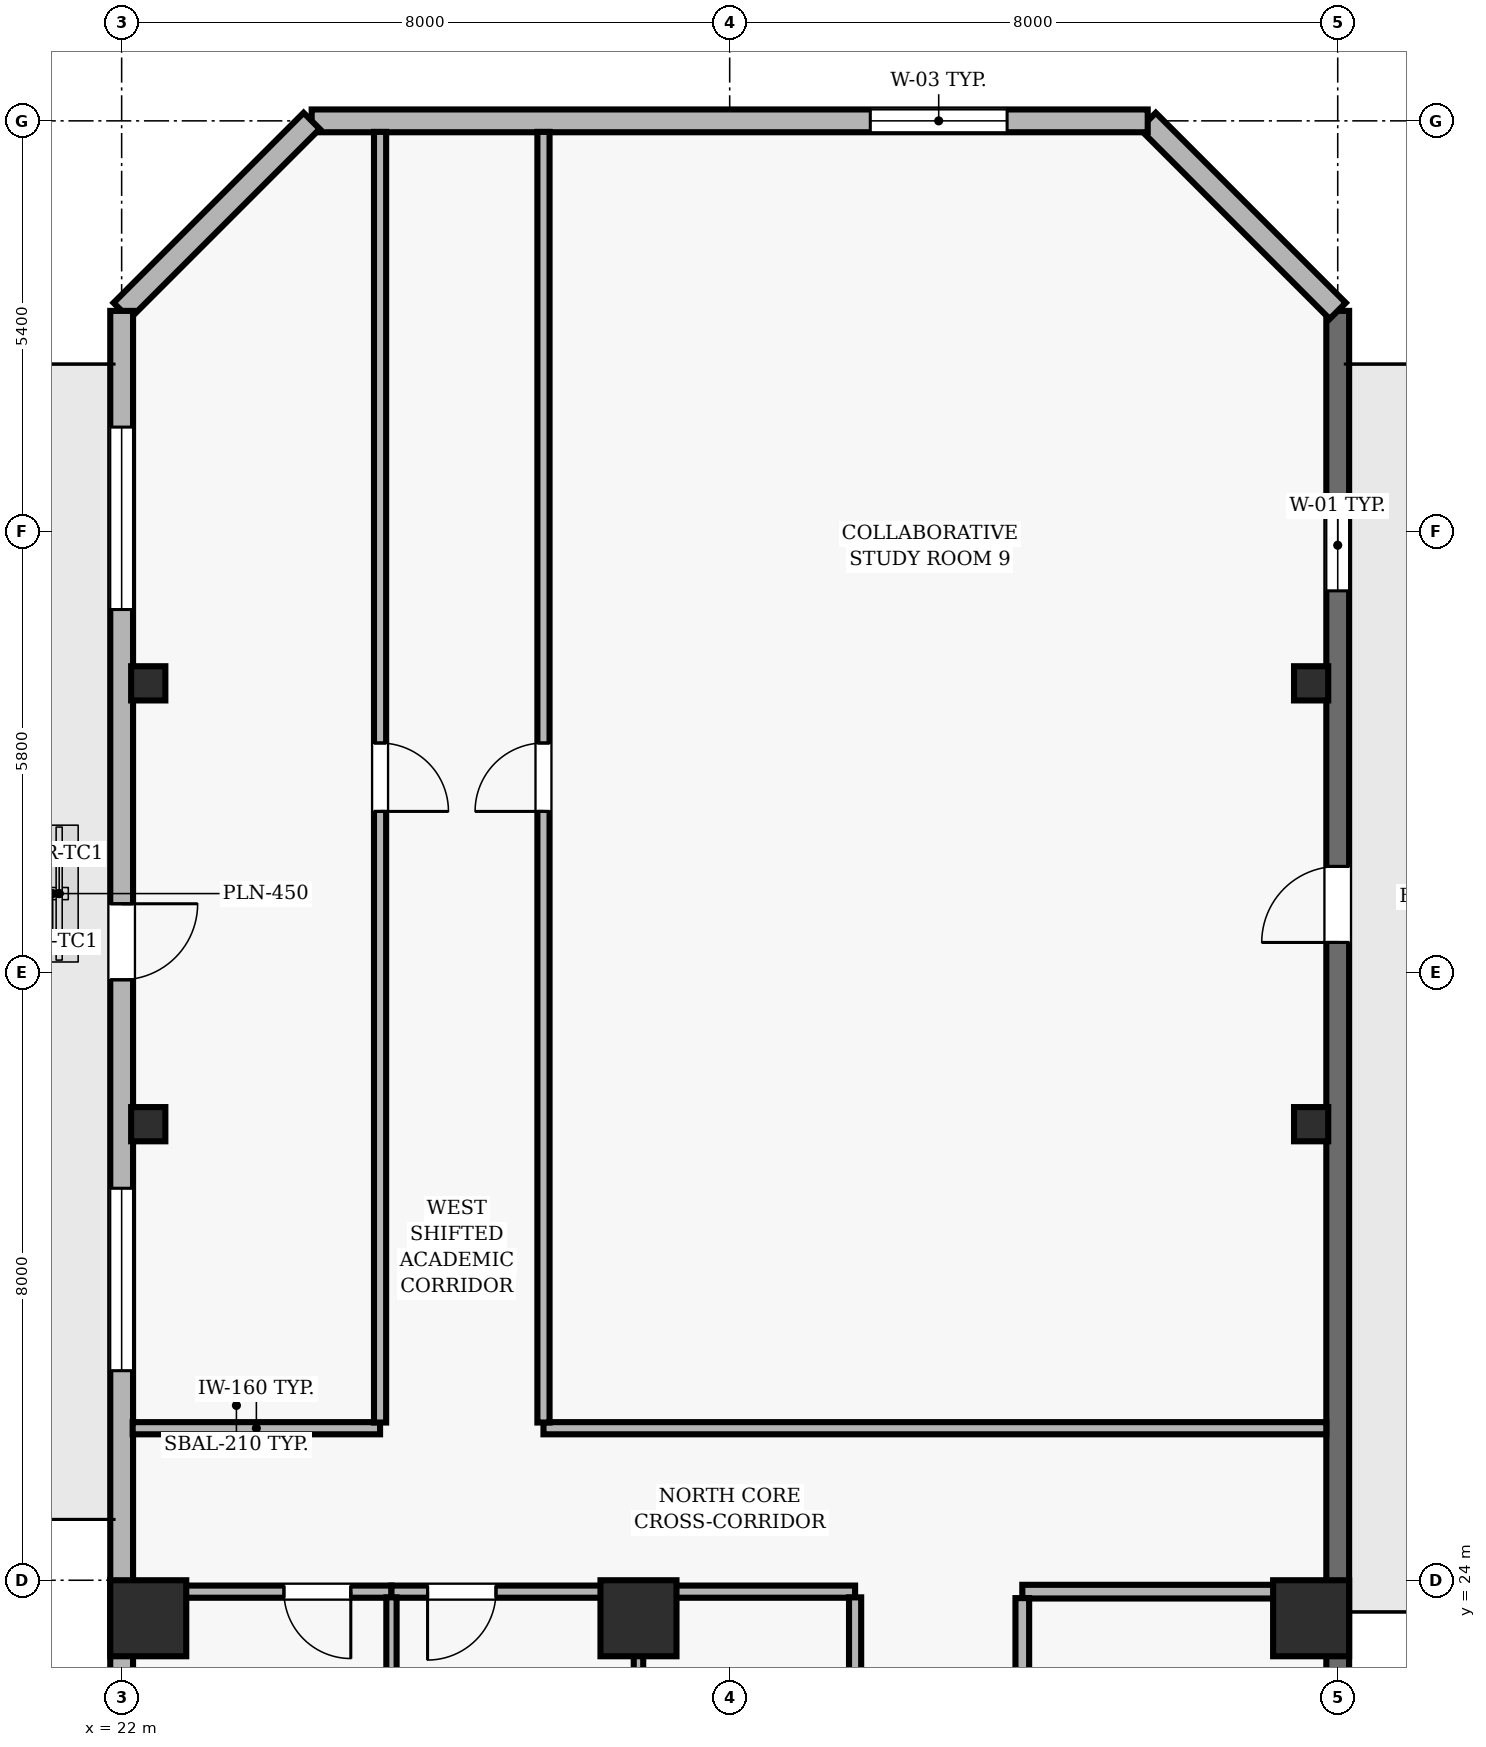
"""IFC4 building model, lengths in metres.
Left out: names, types, materials, properties, quantities, classifications, styles, units other than length and angle.
Written with IfcOpenShell. Run it as: python <this file> out.ifc"""

import sys

from ifc_helpers import new_model, si_unit, direction, frame, frame_2d, origin, origin_2d, place, context, subcontext, project, spatial, rectangle, hollow_rectangle, extrude, element, fill, save


model = new_model("IFC4")
c1 = context("Model", 3, precision=1e-05, world=origin(), true_north=direction((0.0, 1.0)))
c2 = subcontext(c1, "Body", "Model", "MODEL_VIEW")
j1 = project(units=[si_unit("LENGTHUNIT", "METRE"), si_unit("PLANEANGLEUNIT", "RADIAN")], contexts=[c1])
p1 = place(None, origin())
s1 = spatial("IfcSite", under=j1, at=p1, CompositionType="ELEMENT")
p2 = place(p1, origin())
s2 = spatial("IfcBuilding", under=s1, at=p2, CompositionType="ELEMENT")
p3 = place(p2, frame((0.0, 0.0, 214.8)))
s3 = spatial("IfcBuildingStorey", under=s2, at=p3, CompositionType="ELEMENT", Elevation=214.8)
for number, where, z_axis, x_axis in (
    (1, (22.35, 23.5, 0.0), (0.0, 0.0, 1.0), (1.0, 0.0, 0.0)),
    (2, (28.8, 23.5, 0.0), (0.0, 0.0, 1.0), (1.0, 0.0, 0.0)),
    (3, (37.65, 23.5, 0.0), (0.0, 0.0, 1.0), (1.0, 0.0, 0.0)),
):
    element("IfcColumn", number, at=place(p3, frame(where, z_axis=z_axis, x_axis=x_axis)), inside=s3, PredefinedType="COLUMN", context=c2, shape_type="SweptSolid", body=[
        extrude(rectangle(XDim=1.0, YDim=1.0, at=origin_2d()), origin(), (0.0, 0.0, 1.0), 3.9),
    ])
for number, where, z_axis, x_axis in (
    (4, (22.35, 30.0, 0.0), (0.0, 0.0, 1.0), (1.0, 0.0, 0.0)),
    (5, (37.65, 30.0, 0.0), (0.0, 0.0, 1.0), (1.0, 0.0, 0.0)),
    (6, (22.35, 35.8, 0.0), (0.0, 0.0, 1.0), (1.0, 0.0, 0.0)),
    (7, (37.65, 35.8, 0.0), (0.0, 0.0, 1.0), (1.0, 0.0, 0.0)),
):
    element("IfcColumn", number, at=place(p3, frame(where, z_axis=z_axis, x_axis=x_axis)), inside=s3, PredefinedType="COLUMN", context=c2, shape_type="SweptSolid", body=[
        extrude(hollow_rectangle(XDim=0.45, YDim=0.45, WallThickness=0.02, at=origin_2d()), origin(), (0.0, 0.0, 1.0), 3.9),
    ])
p4 = place(p3, frame((38.0, 22.2, 0.0), z_axis=(0.0, 0.0, 1.0), x_axis=(0.0, 1.0, 0.0)))
e8 = element("IfcWall", 8, at=p4, inside=s3, PredefinedType="SOLIDWALL", context=c2, shape_type="SweptSolid", body=[
    extrude(rectangle(XDim=18.5, YDim=0.3, at=frame_2d((9.25, 0.0))), origin(), (0.0, 0.0, 1.0), 3.69),
])
p5 = place(p4, frame((10.191, 0.0, 0.0)))
e9 = element("IfcOpeningElement", 9, at=p5, cuts=e8, PredefinedType="OPENING", context=c2, shape_type="SweptSolid", body=[
    extrude(rectangle(XDim=1.0, YDim=2.2, at=frame_2d((0.5, 1.1))), frame((0.0, 0.16, 0.0), z_axis=(0.0, -1.0, 0.0), x_axis=(1.0, 0.0, 0.0)), (0.0, 0.0, 1.0), 0.32),
])
p6 = place(p4, frame((14.817, 0.0, 0.9)))
e10 = element("IfcOpeningElement", 10, at=p6, cuts=e8, PredefinedType="OPENING", context=c2, shape_type="SweptSolid", body=[
    extrude(rectangle(XDim=1.2, YDim=1.6, at=frame_2d((0.6, 0.8))), frame((0.0, 0.16, 0.0), z_axis=(0.0, -1.0, 0.0), x_axis=(1.0, 0.0, 0.0)), (0.0, 0.0, 1.0), 0.32),
])
p7 = place(p3, frame((38.0, 40.7, 0.0), z_axis=(0.0, 0.0, 1.0), x_axis=(-0.707106781187, 0.707106781187, 0.0)))
e11 = element("IfcWall", 11, at=p7, inside=s3, PredefinedType="SOLIDWALL", context=c2, shape_type="SweptSolid", body=[
    extrude(rectangle(XDim=3.536, YDim=0.3, at=frame_2d((1.768, 0.0))), origin(), (0.0, 0.0, 1.0), 3.69),
])
p8 = place(p3, frame((35.5, 43.2, 0.0), z_axis=(0.0, 0.0, 1.0), x_axis=(-1.0, 0.0, 0.0)))
e12 = element("IfcWall", 12, at=p8, inside=s3, PredefinedType="SOLIDWALL", context=c2, shape_type="SweptSolid", body=[
    extrude(rectangle(XDim=11.0, YDim=0.3, at=frame_2d((5.5, 0.0))), origin(), (0.0, 0.0, 1.0), 3.69),
])
p9 = place(p8, frame((1.85, 0.0, 0.9)))
e13 = element("IfcOpeningElement", 13, at=p9, cuts=e12, PredefinedType="OPENING", context=c2, shape_type="SweptSolid", body=[
    extrude(rectangle(XDim=1.8, YDim=1.6, at=frame_2d((0.9, 0.8))), frame((0.0, 0.16, 0.0), z_axis=(0.0, -1.0, 0.0), x_axis=(1.0, 0.0, 0.0)), (0.0, 0.0, 1.0), 0.32),
])
p10 = place(p3, frame((24.5, 43.2, 0.0), z_axis=(0.0, 0.0, 1.0), x_axis=(-0.707106781187, -0.707106781187, 0.0)))
e14 = element("IfcWall", 14, at=p10, inside=s3, PredefinedType="SOLIDWALL", context=c2, shape_type="SweptSolid", body=[
    extrude(rectangle(XDim=3.536, YDim=0.3, at=frame_2d((1.768, 0.0))), origin(), (0.0, 0.0, 1.0), 3.69),
])
p11 = place(p3, frame((22.0, 40.7, 0.0), z_axis=(0.0, 0.0, 1.0), x_axis=(0.0, -1.0, 0.0)))
e15 = element("IfcWall", 15, at=p11, inside=s3, PredefinedType="SOLIDWALL", context=c2, shape_type="SweptSolid", body=[
    extrude(rectangle(XDim=38.2, YDim=0.3, at=frame_2d((19.1, 0.0))), origin(), (0.0, 0.0, 1.0), 3.69),
])
p12 = place(p11, frame((7.8, 0.0, 0.0)))
e16 = element("IfcOpeningElement", 16, at=p12, cuts=e15, PredefinedType="OPENING", context=c2, shape_type="SweptSolid", body=[
    extrude(rectangle(XDim=1.0, YDim=2.2, at=frame_2d((0.5, 1.1))), frame((0.0, 0.16, 0.0), z_axis=(0.0, -1.0, 0.0), x_axis=(1.0, 0.0, 0.0)), (0.0, 0.0, 1.0), 0.32),
])
p13 = place(p11, frame((1.529, 0.0, 0.9)))
e17 = element("IfcOpeningElement", 17, at=p13, cuts=e15, PredefinedType="OPENING", context=c2, shape_type="SweptSolid", body=[
    extrude(rectangle(XDim=2.4, YDim=1.6, at=frame_2d((1.2, 0.8))), frame((0.0, 0.16, 0.0), z_axis=(0.0, -1.0, 0.0), x_axis=(1.0, 0.0, 0.0)), (0.0, 0.0, 1.0), 0.32),
])
p14 = place(p11, frame((11.543, 0.0, 0.9)))
e18 = element("IfcOpeningElement", 18, at=p14, cuts=e15, PredefinedType="OPENING", context=c2, shape_type="SweptSolid", body=[
    extrude(rectangle(XDim=2.4, YDim=1.6, at=frame_2d((1.2, 0.8))), frame((0.0, 0.16, 0.0), z_axis=(0.0, -1.0, 0.0), x_axis=(1.0, 0.0, 0.0)), (0.0, 0.0, 1.0), 0.32),
])
p15 = place(p11, frame((18.35, 0.0, 0.9)))
e19 = element("IfcOpeningElement", 19, at=p15, cuts=e15, PredefinedType="OPENING", context=c2, shape_type="SweptSolid", body=[
    extrude(rectangle(XDim=2.4, YDim=1.6, at=frame_2d((1.2, 0.8))), frame((0.0, 0.16, 0.0), z_axis=(0.0, -1.0, 0.0), x_axis=(1.0, 0.0, 0.0)), (0.0, 0.0, 1.0), 0.32),
])
p16 = place(p11, frame((22.907, 0.0, 0.9)))
e20 = element("IfcOpeningElement", 20, at=p16, cuts=e15, PredefinedType="OPENING", context=c2, shape_type="SweptSolid", body=[
    extrude(rectangle(XDim=2.4, YDim=1.6, at=frame_2d((1.2, 0.8))), frame((0.0, 0.16, 0.0), z_axis=(0.0, -1.0, 0.0), x_axis=(1.0, 0.0, 0.0)), (0.0, 0.0, 1.0), 0.32),
])
p17 = place(p11, frame((28.814, 0.0, 0.9)))
e21 = element("IfcOpeningElement", 21, at=p17, cuts=e15, PredefinedType="OPENING", context=c2, shape_type="SweptSolid", body=[
    extrude(rectangle(XDim=2.4, YDim=1.6, at=frame_2d((1.2, 0.8))), frame((0.0, 0.16, 0.0), z_axis=(0.0, -1.0, 0.0), x_axis=(1.0, 0.0, 0.0)), (0.0, 0.0, 1.0), 0.32),
])
p18 = place(p3, frame((25.4, 26.0, 0.0), z_axis=(0.0, 0.0, 1.0), x_axis=(-1.0, 0.0, 0.0)))
e22 = element("IfcWall", 22, at=p18, inside=s3, PredefinedType="PARTITIONING", context=c2, shape_type="SweptSolid", body=[
    extrude(rectangle(XDim=3.255, YDim=0.16, at=frame_2d((1.627, 0.0))), origin(), (0.0, 0.0, 1.0), 3.69),
])
p19 = place(p3, frame((25.55, 23.85, 0.0), z_axis=(0.0, 0.0, 1.0), x_axis=(-1.0, 0.0, 0.0)))
e23 = element("IfcWall", 23, at=p19, inside=s3, PredefinedType="PARTITIONING", context=c2, shape_type="SweptSolid", body=[
    extrude(rectangle(XDim=3.35, YDim=0.16, at=frame_2d((1.675, 0.0))), origin(), (0.0, 0.0, 1.0), 3.139),
])
p20 = place(p19, frame((0.535, 0.0, 0.0)))
e24 = element("IfcOpeningElement", 24, at=p20, cuts=e23, PredefinedType="OPENING", context=c2, shape_type="SweptSolid", body=[
    extrude(rectangle(XDim=0.88, YDim=2.1, at=frame_2d((0.44, 1.05))), frame((0.0, 0.09, 0.0), z_axis=(0.0, -1.0, 0.0), x_axis=(1.0, 0.0, 0.0)), (0.0, 0.0, 1.0), 0.18),
])
p21 = place(p3, frame((28.8, 23.85, 0.0), z_axis=(0.0, 0.0, 1.0), x_axis=(-1.0, 0.0, 0.0)))
e25 = element("IfcWall", 25, at=p21, inside=s3, PredefinedType="PARTITIONING", context=c2, shape_type="SweptSolid", body=[
    extrude(rectangle(XDim=3.25, YDim=0.16, at=frame_2d((1.625, 0.0))), origin(), (0.0, 0.0, 1.0), 3.139),
])
p22 = place(p21, frame((1.875, 0.0, 0.0)))
e26 = element("IfcOpeningElement", 26, at=p22, cuts=e25, PredefinedType="OPENING", context=c2, shape_type="SweptSolid", body=[
    extrude(rectangle(XDim=0.9, YDim=2.1, at=frame_2d((0.45, 1.05))), frame((0.0, 0.09, 0.0), z_axis=(0.0, -1.0, 0.0), x_axis=(1.0, 0.0, 0.0)), (0.0, 0.0, 1.0), 0.18),
])
p23 = place(p3, frame((31.65, 23.85, 0.0), z_axis=(0.0, 0.0, 1.0), x_axis=(-1.0, 0.0, 0.0)))
e27 = element("IfcWall", 27, at=p23, inside=s3, PredefinedType="PARTITIONING", context=c2, shape_type="SweptSolid", body=[
    extrude(rectangle(XDim=2.85, YDim=0.16, at=frame_2d((1.425, 0.0))), origin(), (0.0, 0.0, 1.0), 3.139),
])
p24 = place(p3, frame((37.85, 23.85, 0.0), z_axis=(0.0, 0.0, 1.0), x_axis=(-1.0, 0.0, 0.0)))
e28 = element("IfcWall", 28, at=p24, inside=s3, PredefinedType="PARTITIONING", context=c2, shape_type="SweptSolid", body=[
    extrude(rectangle(XDim=4.0, YDim=0.18, at=frame_2d((2.0, 0.0))), origin(), (0.0, 0.0, 1.0), 3.139),
])
p25 = place(p3, frame((37.85, 26.0, 0.0), z_axis=(0.0, 0.0, 1.0), x_axis=(-1.0, 0.0, 0.0)))
e29 = element("IfcWall", 29, at=p25, inside=s3, PredefinedType="PARTITIONING", context=c2, shape_type="SweptSolid", body=[
    extrude(rectangle(XDim=10.3, YDim=0.16, at=frame_2d((5.15, 0.0))), origin(), (0.0, 0.0, 1.0), 3.69),
])
p26 = place(p3, frame((25.4, 43.055, 0.0), z_axis=(0.0, 0.0, 1.0), x_axis=(0.0, -1.0, 0.0)))
e30 = element("IfcWall", 30, at=p26, inside=s3, PredefinedType="PARTITIONING", context=c2, shape_type="SweptSolid", body=[
    extrude(rectangle(XDim=16.98, YDim=0.16, at=frame_2d((8.49, 0.0))), origin(), (0.0, 0.0, 1.0), 3.69),
])
p27 = place(p26, frame((8.04, 0.0, 0.0)))
e31 = element("IfcOpeningElement", 31, at=p27, cuts=e30, PredefinedType="OPENING", context=c2, shape_type="SweptSolid", body=[
    extrude(rectangle(XDim=0.9, YDim=2.1, at=frame_2d((0.45, 1.05))), frame((0.0, 0.09, 0.0), z_axis=(0.0, -1.0, 0.0), x_axis=(1.0, 0.0, 0.0)), (0.0, 0.0, 1.0), 0.18),
])
p28 = place(p3, frame((25.55, 19.16, 0.0), z_axis=(0.0, 0.0, 1.0), x_axis=(0.0, 1.0, 0.0)))
e32 = element("IfcWall", 32, at=p28, inside=s3, PredefinedType="PARTITIONING", context=c2, shape_type="SweptSolid", body=[
    extrude(rectangle(XDim=4.615, YDim=0.135, at=frame_2d((2.308, 0.0))), origin(), (0.0, 0.0, 1.0), 3.69),
])
p29 = place(p3, frame((27.55, 26.075, 0.0), z_axis=(0.0, 0.0, 1.0), x_axis=(0.0, 1.0, 0.0)))
e33 = element("IfcWall", 33, at=p29, inside=s3, PredefinedType="PARTITIONING", context=c2, shape_type="SweptSolid", body=[
    extrude(rectangle(XDim=16.98, YDim=0.16, at=frame_2d((8.49, 0.0))), origin(), (0.0, 0.0, 1.0), 3.69),
])
p30 = place(p29, frame((8.04, 0.0, 0.0)))
e34 = element("IfcOpeningElement", 34, at=p30, cuts=e33, PredefinedType="OPENING", context=c2, shape_type="SweptSolid", body=[
    extrude(rectangle(XDim=0.9, YDim=2.1, at=frame_2d((0.45, 1.05))), frame((0.0, 0.09, 0.0), z_axis=(0.0, -1.0, 0.0), x_axis=(1.0, 0.0, 0.0)), (0.0, 0.0, 1.0), 0.18),
])
p31 = place(p3, frame((28.8, 23.775, 0.0), z_axis=(0.0, 0.0, 1.0), x_axis=(0.0, -1.0, 0.0)))
e35 = element("IfcWall", 35, at=p31, inside=s3, PredefinedType="PARTITIONING", context=c2, shape_type="SweptSolid", body=[
    extrude(rectangle(XDim=4.615, YDim=0.125, at=frame_2d((2.308, 0.0))), origin(), (0.0, 0.0, 1.0), 3.69),
])
p32 = place(p3, frame((31.65, 19.01, 0.0), z_axis=(0.0, 0.0, 1.0), x_axis=(0.0, 1.0, 0.0)))
e36 = element("IfcWall", 36, at=p32, inside=s3, PredefinedType="PARTITIONING", context=c2, shape_type="SweptSolid", body=[
    extrude(rectangle(XDim=4.765, YDim=0.16, at=frame_2d((2.382, 0.0))), origin(), (0.0, 0.0, 1.0), 3.69),
])
p33 = place(p32, frame((1.932, 0.0, 0.0)))
e37 = element("IfcOpeningElement", 37, at=p33, cuts=e36, PredefinedType="OPENING", context=c2, shape_type="SweptSolid", body=[
    extrude(rectangle(XDim=0.9, YDim=2.1, at=frame_2d((0.45, 1.05))), frame((0.0, 0.09, 0.0), z_axis=(0.0, -1.0, 0.0), x_axis=(1.0, 0.0, 0.0)), (0.0, 0.0, 1.0), 0.18),
])
p34 = place(p3, frame((33.85, 17.735, 0.0), z_axis=(0.0, 0.0, 1.0), x_axis=(0.0, 1.0, 0.0)))
e38 = element("IfcWall", 38, at=p34, inside=s3, PredefinedType="PARTITIONING", context=c2, shape_type="SweptSolid", body=[
    extrude(rectangle(XDim=6.03, YDim=0.18, at=frame_2d((3.015, 0.0))), origin(), (0.0, 0.0, 1.0), 3.69),
])
p35 = place(p34, frame((2.54, 0.0, 0.0)))
e39 = element("IfcOpeningElement", 39, at=p35, cuts=e38, PredefinedType="OPENING", context=c2, shape_type="SweptSolid", body=[
    extrude(rectangle(XDim=0.95, YDim=2.1, at=frame_2d((0.475, 1.05))), frame((0.0, 0.1, 0.0), z_axis=(0.0, -1.0, 0.0), x_axis=(1.0, 0.0, 0.0)), (0.0, 0.0, 1.0), 0.2),
])
p36 = place(p5, origin())
e40 = element("IfcDoor", 40, at=p36, inside=s3, OperationType="SINGLE_SWING_LEFT", PredefinedType="DOOR", context=c2, shape_type="SweptSolid", body=[
    extrude(rectangle(XDim=1.0, YDim=2.2, at=frame_2d((0.5, 1.1))), frame((0.0, 0.025, 0.0), z_axis=(0.0, -1.0, 0.0), x_axis=(1.0, 0.0, 0.0)), (0.0, 0.0, 1.0), 0.05),
])
fill(e9, e40)
p37 = place(p6, origin())
e41 = element("IfcWindow", 41, at=p37, inside=s3, PartitioningType="SINGLE_PANEL", PredefinedType="WINDOW", context=c2, shape_type="SweptSolid", body=[
    extrude(rectangle(XDim=1.2, YDim=1.6, at=frame_2d((0.6, 0.8))), frame((0.0, 0.03, 0.0), z_axis=(0.0, -1.0, 0.0), x_axis=(1.0, 0.0, 0.0)), (0.0, 0.0, 1.0), 0.06),
])
fill(e10, e41)
p38 = place(p9, origin())
e42 = element("IfcWindow", 42, at=p38, inside=s3, PartitioningType="SINGLE_PANEL", PredefinedType="WINDOW", context=c2, shape_type="SweptSolid", body=[
    extrude(rectangle(XDim=1.8, YDim=1.6, at=frame_2d((0.9, 0.8))), frame((0.0, 0.03, 0.0), z_axis=(0.0, -1.0, 0.0), x_axis=(1.0, 0.0, 0.0)), (0.0, 0.0, 1.0), 0.06),
])
fill(e13, e42)
p39 = place(p12, origin())
e43 = element("IfcDoor", 43, at=p39, inside=s3, OperationType="SINGLE_SWING_LEFT", PredefinedType="DOOR", context=c2, shape_type="SweptSolid", body=[
    extrude(rectangle(XDim=1.0, YDim=2.2, at=frame_2d((0.5, 1.1))), frame((0.0, 0.025, 0.0), z_axis=(0.0, -1.0, 0.0), x_axis=(1.0, 0.0, 0.0)), (0.0, 0.0, 1.0), 0.05),
])
fill(e16, e43)
p40 = place(p13, origin())
e44 = element("IfcWindow", 44, at=p40, inside=s3, PartitioningType="SINGLE_PANEL", PredefinedType="WINDOW", context=c2, shape_type="SweptSolid", body=[
    extrude(rectangle(XDim=2.4, YDim=1.6, at=frame_2d((1.2, 0.8))), frame((0.0, 0.03, 0.0), z_axis=(0.0, -1.0, 0.0), x_axis=(1.0, 0.0, 0.0)), (0.0, 0.0, 1.0), 0.06),
])
fill(e17, e44)
p41 = place(p14, origin())
e45 = element("IfcWindow", 45, at=p41, inside=s3, PartitioningType="SINGLE_PANEL", PredefinedType="WINDOW", context=c2, shape_type="SweptSolid", body=[
    extrude(rectangle(XDim=2.4, YDim=1.6, at=frame_2d((1.2, 0.8))), frame((0.0, 0.03, 0.0), z_axis=(0.0, -1.0, 0.0), x_axis=(1.0, 0.0, 0.0)), (0.0, 0.0, 1.0), 0.06),
])
fill(e18, e45)
p42 = place(p20, origin())
e46 = element("IfcDoor", 46, at=p42, inside=s3, OperationType="SINGLE_SWING_LEFT", PredefinedType="DOOR", context=c2, shape_type="SweptSolid", body=[
    extrude(rectangle(XDim=0.88, YDim=2.1, at=frame_2d((0.44, 1.05))), frame((0.0, 0.025, 0.0), z_axis=(0.0, -1.0, 0.0), x_axis=(1.0, 0.0, 0.0)), (0.0, 0.0, 1.0), 0.05),
])
fill(e24, e46)
p43 = place(p22, origin())
e47 = element("IfcDoor", 47, at=p43, inside=s3, OperationType="SINGLE_SWING_RIGHT", PredefinedType="DOOR", context=c2, shape_type="SweptSolid", body=[
    extrude(rectangle(XDim=0.9, YDim=2.1, at=frame_2d((0.45, 1.05))), frame((0.0, 0.025, 0.0), z_axis=(0.0, -1.0, 0.0), x_axis=(1.0, 0.0, 0.0)), (0.0, 0.0, 1.0), 0.05),
])
fill(e26, e47)
p44 = place(p27, origin())
e48 = element("IfcDoor", 48, at=p44, inside=s3, OperationType="SINGLE_SWING_RIGHT", PredefinedType="DOOR", context=c2, shape_type="SweptSolid", body=[
    extrude(rectangle(XDim=0.9, YDim=2.1, at=frame_2d((0.45, 1.05))), frame((0.0, 0.025, 0.0), z_axis=(0.0, -1.0, 0.0), x_axis=(1.0, 0.0, 0.0)), (0.0, 0.0, 1.0), 0.05),
])
fill(e31, e48)
p45 = place(p30, origin())
e49 = element("IfcDoor", 49, at=p45, inside=s3, OperationType="SINGLE_SWING_LEFT", PredefinedType="DOOR", context=c2, shape_type="SweptSolid", body=[
    extrude(rectangle(XDim=0.9, YDim=2.1, at=frame_2d((0.45, 1.05))), frame((0.0, 0.025, 0.0), z_axis=(0.0, -1.0, 0.0), x_axis=(1.0, 0.0, 0.0)), (0.0, 0.0, 1.0), 0.05),
])
fill(e34, e49)
save(model, sys.argv[1])
